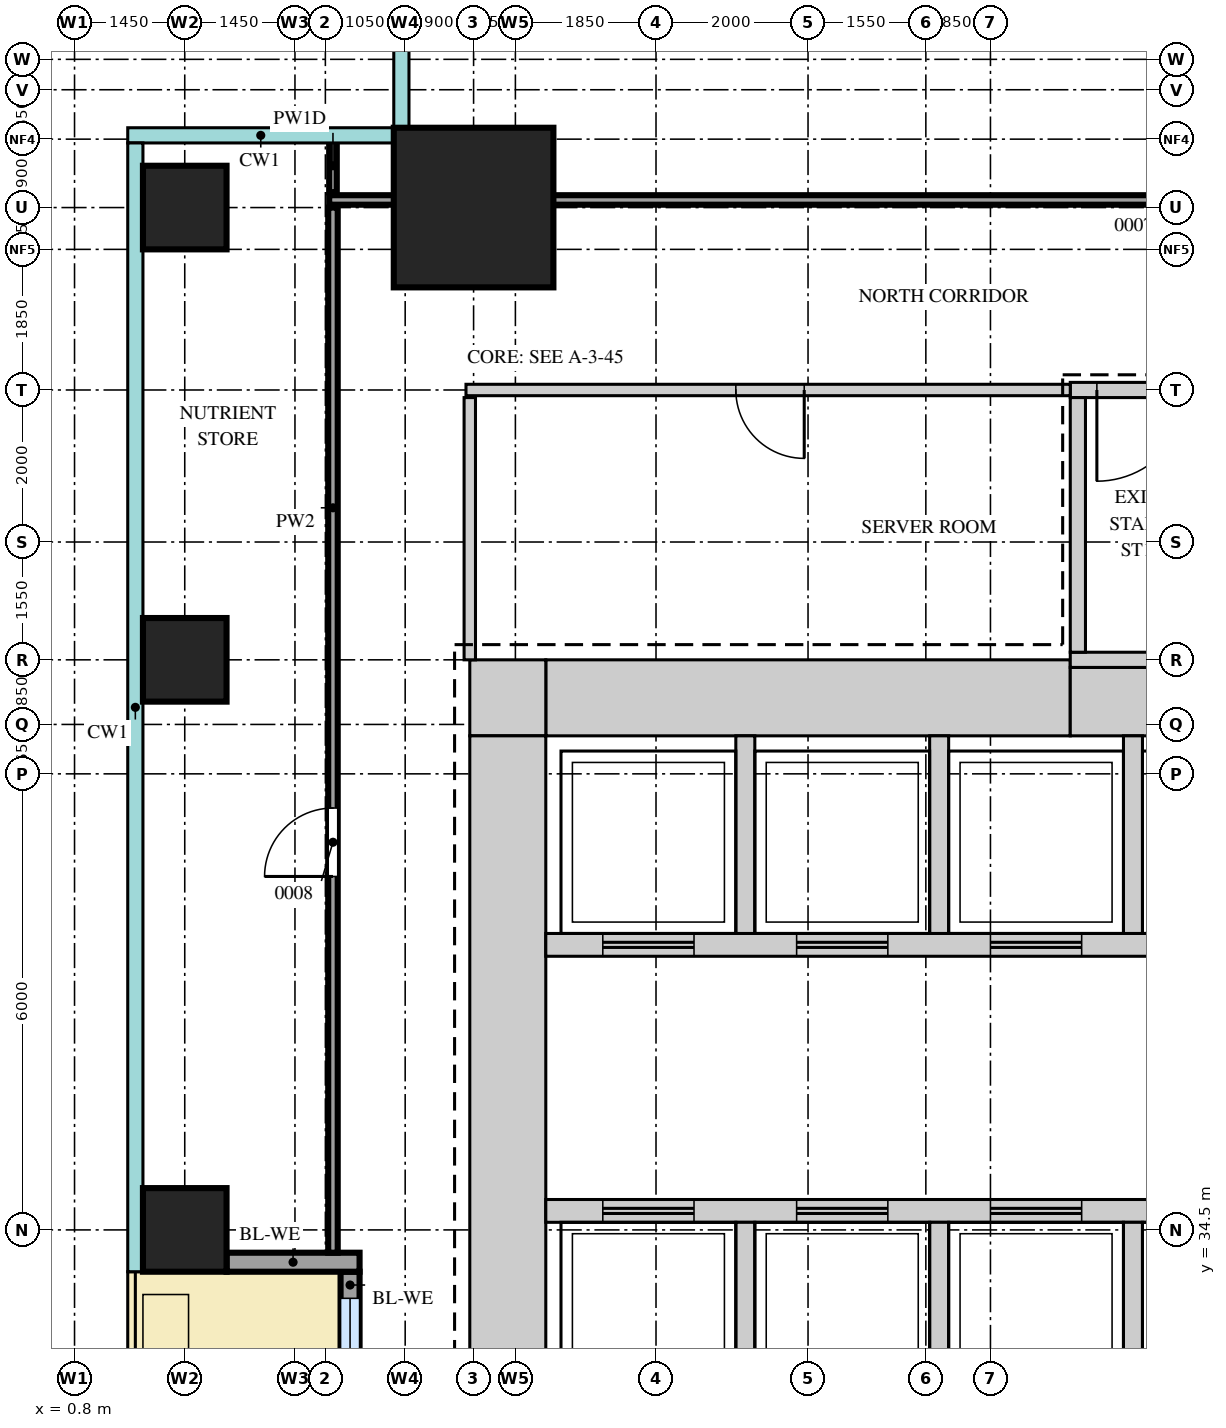
"""IFC4 building model, lengths in metres.
Left out: names, types, materials, properties, quantities, classifications, styles, units other than length and angle.
Written with IfcOpenShell. Run it as: python <this file> out.ifc"""

import sys

from ifc_helpers import new_model, si_unit, direction, frame, frame_2d, origin, origin_2d, place, context, subcontext, project, spatial, rectangle, extrude, source, transform, mapped, element, fill, save


model = new_model("IFC4")
c1 = context("Model", 3, precision=1e-05, world=origin(), true_north=direction((0.0, 1.0)))
c2 = subcontext(c1, "Body", "Model", "MODEL_VIEW")
j1 = project(units=[si_unit("LENGTHUNIT", "METRE"), si_unit("PLANEANGLEUNIT", "RADIAN")], contexts=[c1])
p1 = place(None, origin())
s1 = spatial("IfcSite", under=j1, at=p1, CompositionType="ELEMENT")
p2 = place(p1, origin())
s2 = spatial("IfcBuilding", under=s1, at=p2, CompositionType="ELEMENT")
p3 = place(p2, frame((0.0, 0.0, 136.7)))
s3 = spatial("IfcBuildingStorey", under=s2, at=p3, CompositionType="ELEMENT", Elevation=136.7)
m1 = source(origin(), c2, "Body", "SweptSolid", [
    extrude(rectangle(XDim=6.9, YDim=1.0, at=frame_2d((3.45, 0.0))), origin(), (0.0, 0.0, 1.0), 4.1),
])
p4 = place(p3, frame((7.0, 41.5, 0.0), z_axis=(0.0, 0.0, 1.0), x_axis=(1.0, 0.0, 0.0)))
e1 = element("IfcWall", 1, at=p4, inside=s3, PredefinedType="SHEAR", context=c2, shape_type="MappedRepresentation", body=[
    mapped(m1, transform((0.0, 0.0, 0.0))),
])
m2 = source(origin(), c2, "Body", "SweptSolid", [
    extrude(rectangle(XDim=9.1, YDim=0.9, at=frame_2d((4.55, 0.0))), origin(), (0.0, 0.0, 1.0), 4.1),
])
p5 = place(p3, frame((13.9, 41.45, 0.0), z_axis=(0.0, 0.0, 1.0), x_axis=(1.0, 0.0, 0.0)))
e2 = element("IfcWall", 2, at=p5, inside=s3, PredefinedType="SHEAR", context=c2, shape_type="MappedRepresentation", body=[
    mapped(m2, transform((0.0, 0.0, 0.0))),
])
m3 = source(origin(), c2, "Body", "SweptSolid", [
    extrude(rectangle(XDim=1.0, YDim=1.0, at=frame_2d((0.5, 0.0))), origin(), (0.0, 0.0, 1.0), 4.1),
])
p6 = place(p3, frame((6.0, 41.5, 0.0), z_axis=(0.0, 0.0, 1.0), x_axis=(1.0, 0.0, 0.0)))
e3 = element("IfcWall", 3, at=p6, inside=s3, PredefinedType="SHEAR", context=c2, shape_type="MappedRepresentation", body=[
    mapped(m3, transform((0.0, 0.0, 0.0))),
])
m4 = source(origin(), c2, "Body", "SweptSolid", [
    extrude(rectangle(XDim=28.0, YDim=1.0, at=frame_2d((14.0, 0.0))), origin(), (0.0, 0.0, 1.0), 4.1),
])
p7 = place(p3, frame((6.5, 13.0, 0.0), z_axis=(0.0, 0.0, 1.0), x_axis=(0.0, 1.0, 0.0)))
e4 = element("IfcWall", 4, at=p7, inside=s3, PredefinedType="SHEAR", context=c2, shape_type="MappedRepresentation", body=[
    mapped(m4, transform((0.0, 0.0, 0.0))),
])
m5 = source(origin(), c2, "Body", "SweptSolid", [
    extrude(rectangle(XDim=7.0, YDim=0.2, at=frame_2d((3.5, 0.0))), origin(), (0.0, 0.0, 1.0), 4.1),
])
p8 = place(p3, frame((13.9, 45.55, 0.0), z_axis=(0.0, 0.0, 1.0), x_axis=(1.0, 0.0, 0.0)))
e5 = element("IfcWall", 5, at=p8, inside=s3, PredefinedType="SHEAR", context=c2, shape_type="MappedRepresentation", body=[
    mapped(m5, transform((0.0, 0.0, 0.0))),
])
m6 = source(origin(), c2, "Body", "SweptSolid", [
    extrude(rectangle(XDim=1.2, YDim=2.1, at=frame_2d((0.6, 1.05))), frame((0.0, 0.11, 0.0), z_axis=(0.0, -1.0, 0.0), x_axis=(1.0, 0.0, 0.0)), (0.0, 0.0, 1.0), 0.22),
])
p9 = place(p8, frame((0.35, 0.0, 0.0)))
e6 = element("IfcOpeningElement", 6, at=p9, cuts=e5, PredefinedType="OPENING", context=c2, shape_type="MappedRepresentation", body=[
    mapped(m6, transform((0.0, 0.0, 0.0))),
])
p10 = place(p3, frame((13.9, 42.0, 0.0), z_axis=(0.0, 0.0, 1.0), x_axis=(1.0, 0.0, 0.0)))
e7 = element("IfcWall", 7, at=p10, inside=s3, PredefinedType="SHEAR", context=c2, shape_type="MappedRepresentation", body=[
    mapped(m5, transform((0.0, 0.0, 0.0))),
])
m7 = source(origin(), c2, "Body", "SweptSolid", [
    extrude(rectangle(XDim=3.35, YDim=0.2, at=frame_2d((1.675, 0.0))), origin(), (0.0, 0.0, 1.0), 4.1),
])
p11 = place(p3, frame((14.0, 42.1, 0.0), z_axis=(0.0, 0.0, 1.0), x_axis=(0.0, 1.0, 0.0)))
e8 = element("IfcWall", 8, at=p11, inside=s3, PredefinedType="SHEAR", context=c2, shape_type="MappedRepresentation", body=[
    mapped(m7, transform((0.0, 0.0, 0.0))),
])
m8 = source(origin(), c2, "Body", "SweptSolid", [
    extrude(rectangle(XDim=16.0, YDim=0.3, at=frame_2d((8.0, 0.0))), origin(), (0.0, 0.0, 1.0), 4.1),
])
p12 = place(p3, frame((7.0, 38.25, 0.0), z_axis=(0.0, 0.0, 1.0), x_axis=(1.0, 0.0, 0.0)))
e9 = element("IfcWall", 9, at=p12, inside=s3, PredefinedType="STANDARD", context=c2, shape_type="MappedRepresentation", body=[
    mapped(m8, transform((0.0, 0.0, 0.0))),
])
m9 = source(origin(), c2, "Body", "SweptSolid", [
    extrude(rectangle(XDim=1.2, YDim=2.1, at=frame_2d((0.6, 1.05))), frame((0.0, 0.16, 0.0), z_axis=(0.0, -1.0, 0.0), x_axis=(1.0, 0.0, 0.0)), (0.0, 0.0, 1.0), 0.32),
])
p13 = place(p12, frame((0.75, 0.0, 0.0)))
e10 = element("IfcOpeningElement", 10, at=p13, cuts=e9, PredefinedType="OPENING", context=c2, shape_type="MappedRepresentation", body=[
    mapped(m9, transform((0.0, 0.0, 0.0))),
])
p14 = place(p12, frame((3.3, 0.0, 0.0)))
e11 = element("IfcOpeningElement", 11, at=p14, cuts=e9, PredefinedType="OPENING", context=c2, shape_type="MappedRepresentation", body=[
    mapped(m9, transform((0.0, 0.0, 0.0))),
])
p15 = place(p12, frame((5.85, 0.0, 0.0)))
e12 = element("IfcOpeningElement", 12, at=p15, cuts=e9, PredefinedType="OPENING", context=c2, shape_type="MappedRepresentation", body=[
    mapped(m9, transform((0.0, 0.0, 0.0))),
])
p16 = place(p12, frame((8.4, 0.0, 0.0)))
e13 = element("IfcOpeningElement", 13, at=p16, cuts=e9, PredefinedType="OPENING", context=c2, shape_type="MappedRepresentation", body=[
    mapped(m9, transform((0.0, 0.0, 0.0))),
])
p17 = place(p3, frame((7.0, 34.75, 0.0), z_axis=(0.0, 0.0, 1.0), x_axis=(1.0, 0.0, 0.0)))
e14 = element("IfcWall", 14, at=p17, inside=s3, PredefinedType="STANDARD", context=c2, shape_type="MappedRepresentation", body=[
    mapped(m8, transform((0.0, 0.0, 0.0))),
])
p18 = place(p17, frame((0.75, 0.0, 0.0)))
e15 = element("IfcOpeningElement", 15, at=p18, cuts=e14, PredefinedType="OPENING", context=c2, shape_type="MappedRepresentation", body=[
    mapped(m9, transform((0.0, 0.0, 0.0))),
])
p19 = place(p17, frame((3.3, 0.0, 0.0)))
e16 = element("IfcOpeningElement", 16, at=p19, cuts=e14, PredefinedType="OPENING", context=c2, shape_type="MappedRepresentation", body=[
    mapped(m9, transform((0.0, 0.0, 0.0))),
])
p20 = place(p17, frame((5.85, 0.0, 0.0)))
e17 = element("IfcOpeningElement", 17, at=p20, cuts=e14, PredefinedType="OPENING", context=c2, shape_type="MappedRepresentation", body=[
    mapped(m9, transform((0.0, 0.0, 0.0))),
])
p21 = place(p17, frame((8.4, 0.0, 0.0)))
e18 = element("IfcOpeningElement", 18, at=p21, cuts=e14, PredefinedType="OPENING", context=c2, shape_type="MappedRepresentation", body=[
    mapped(m9, transform((0.0, 0.0, 0.0))),
])
m10 = source(origin(), c2, "Body", "SweptSolid", [
    extrude(rectangle(XDim=2.6, YDim=0.25, at=frame_2d((1.3, 0.0))), origin(), (0.0, 0.0, 1.0), 4.1),
])
for number, where, z_axis, x_axis in (
    (19, (9.625, 38.4, 0.0), (0.0, 0.0, 1.0), (0.0, 1.0, 0.0)),
    (20, (12.175, 38.4, 0.0), (0.0, 0.0, 1.0), (0.0, 1.0, 0.0)),
    (21, (14.725, 38.4, 0.0), (0.0, 0.0, 1.0), (0.0, 1.0, 0.0)),
):
    element("IfcWall", number, at=place(p3, frame(where, z_axis=z_axis, x_axis=x_axis)), inside=s3, PredefinedType="STANDARD", context=c2, shape_type="MappedRepresentation", body=[
        mapped(m10, transform((0.0, 0.0, 0.0))),
    ])
m11 = source(origin(), c2, "Body", "SweptSolid", [
    extrude(rectangle(XDim=2.4, YDim=0.25, at=frame_2d((1.2, 0.0))), origin(), (0.0, 0.0, 1.0), 4.1),
])
for number, where, z_axis, x_axis in (
    (22, (9.625, 32.2, 0.0), (0.0, 0.0, 1.0), (0.0, 1.0, 0.0)),
    (23, (12.175, 32.2, 0.0), (0.0, 0.0, 1.0), (0.0, 1.0, 0.0)),
    (24, (14.725, 32.2, 0.0), (0.0, 0.0, 1.0), (0.0, 1.0, 0.0)),
):
    element("IfcWall", number, at=place(p3, frame(where, z_axis=z_axis, x_axis=x_axis)), inside=s3, PredefinedType="STANDARD", context=c2, shape_type="MappedRepresentation", body=[
        mapped(m11, transform((0.0, 0.0, 0.0))),
    ])
m12 = source(origin(), c2, "Body", "SweptSolid", [
    extrude(rectangle(XDim=2.1, YDim=2.1, at=origin_2d()), origin(), (0.0, 0.0, 1.0), 4.4),
])
p22 = place(p3, frame((6.05, 47.95, 0.0), z_axis=(0.0, 0.0, 1.0), x_axis=(1.0, 0.0, 0.0)))
e25 = element("IfcColumn", 25, at=p22, inside=s3, PredefinedType="COLUMN", context=c2, shape_type="MappedRepresentation", body=[
    mapped(m12, transform((0.0, 0.0, 0.0))),
])
m13 = source(origin(), c2, "Body", "SweptSolid", [
    extrude(rectangle(XDim=1.1, YDim=1.1, at=origin_2d()), origin(), (0.0, 0.0, 1.0), 4.1),
])
for number, where, z_axis, x_axis in (
    (26, (2.25, 34.5, 0.0), (0.0, 0.0, 1.0), (1.0, 0.0, 0.0)),
    (27, (2.25, 42.0, 0.0), (0.0, 0.0, 1.0), (1.0, 0.0, 0.0)),
    (28, (2.25, 47.95, 0.0), (0.0, 0.0, 1.0), (1.0, 0.0, 0.0)),
):
    element("IfcColumn", number, at=place(p3, frame(where, z_axis=z_axis, x_axis=x_axis)), inside=s3, PredefinedType="COLUMN", context=c2, shape_type="MappedRepresentation", body=[
        mapped(m13, transform((0.0, 0.0, 0.0))),
    ])
m14 = source(origin(), c2, "Body", "SweptSolid", [
    extrude(rectangle(XDim=6.4, YDim=0.25, at=frame_2d((3.2, 0.0))), origin(), (0.0, 0.0, 1.0), 3.5),
])
p23 = place(p3, frame((4.425, 27.55, 0.0), z_axis=(0.0, 0.0, 1.0), x_axis=(0.0, 1.0, 0.0)))
e29 = element("IfcWall", 29, at=p23, inside=s3, PredefinedType="SOLIDWALL", context=c2, shape_type="MappedRepresentation", body=[
    mapped(m14, transform((0.0, 0.0, 0.0))),
])
m15 = source(origin(), c2, "Body", "SweptSolid", [
    extrude(rectangle(XDim=1.65, YDim=2.4, at=frame_2d((0.825, 1.2))), frame((0.0, 0.135, 0.0), z_axis=(0.0, -1.0, 0.0), x_axis=(1.0, 0.0, 0.0)), (0.0, 0.0, 1.0), 0.27),
])
p24 = place(p23, frame((0.35, 0.0, 0.0)))
e30 = element("IfcOpeningElement", 30, at=p24, cuts=e29, PredefinedType="OPENING", context=c2, shape_type="MappedRepresentation", body=[
    mapped(m15, transform((0.0, 0.0, 0.0))),
])
p25 = place(p23, frame((4.4, 0.0, 0.0)))
e31 = element("IfcOpeningElement", 31, at=p25, cuts=e29, PredefinedType="OPENING", context=c2, shape_type="MappedRepresentation", body=[
    mapped(m15, transform((0.0, 0.0, 0.0))),
])
m16 = source(origin(), c2, "Body", "SweptSolid", [
    extrude(rectangle(XDim=1.8, YDim=2.4, at=frame_2d((0.9, 1.2))), frame((0.0, 0.135, 0.0), z_axis=(0.0, -1.0, 0.0), x_axis=(1.0, 0.0, 0.0)), (0.0, 0.0, 1.0), 0.27),
])
p26 = place(p23, frame((2.3, 0.0, 0.0)))
e32 = element("IfcOpeningElement", 32, at=p26, cuts=e29, PredefinedType="OPENING", context=c2, shape_type="MappedRepresentation", body=[
    mapped(m16, transform((0.0, 0.0, 0.0))),
])
m17 = source(origin(), c2, "Body", "SweptSolid", [
    extrude(rectangle(XDim=1.75, YDim=0.25, at=frame_2d((0.875, 0.0))), origin(), (0.0, 0.0, 1.0), 3.5),
])
p27 = place(p3, frame((2.8, 34.075, 0.0), z_axis=(0.0, 0.0, 1.0), x_axis=(1.0, 0.0, 0.0)))
e33 = element("IfcWall", 33, at=p27, inside=s3, PredefinedType="SOLIDWALL", context=c2, shape_type="MappedRepresentation", body=[
    mapped(m17, transform((0.0, 0.0, 0.0))),
])
m18 = source(origin(), c2, "Body", "SweptSolid", [
    extrude(rectangle(XDim=13.75, YDim=0.125, at=frame_2d((6.875, 0.0))), origin(), (0.0, 0.0, 1.0), 4.2),
])
p28 = place(p3, frame((4.2, 34.2, 0.0), z_axis=(0.0, 0.0, 1.0), x_axis=(0.0, 1.0, 0.0)))
e34 = element("IfcWall", 34, at=p28, inside=s3, PredefinedType="PARTITIONING", context=c2, shape_type="MappedRepresentation", body=[
    mapped(m18, transform((0.0, 0.0, 0.0))),
])
m19 = source(origin(), c2, "Body", "SweptSolid", [
    extrude(rectangle(XDim=0.9, YDim=2.1, at=frame_2d((0.45, 1.05))), frame((0.0, 0.073, 0.0), z_axis=(0.0, -1.0, 0.0), x_axis=(1.0, 0.0, 0.0)), (0.0, 0.0, 1.0), 0.145),
])
p29 = place(p28, frame((4.95, 0.0, 0.0)))
e35 = element("IfcOpeningElement", 35, at=p29, cuts=e34, PredefinedType="OPENING", context=c2, shape_type="MappedRepresentation", body=[
    mapped(m19, transform((0.0, 0.0, 0.0))),
])
m20 = source(origin(), c2, "Body", "SweptSolid", [
    extrude(rectangle(XDim=3.45, YDim=0.15, at=frame_2d((1.725, 0.0))), origin(), (0.0, 0.0, 1.0), 4.2),
])
p30 = place(p3, frame((6.0, 42.0, 0.0), z_axis=(0.0, 0.0, 1.0), x_axis=(0.0, 1.0, 0.0)))
e36 = element("IfcWall", 36, at=p30, inside=s3, PredefinedType="PARTITIONING", context=c2, shape_type="MappedRepresentation", body=[
    mapped(m20, transform((0.0, 0.0, 0.0))),
])
m21 = source(origin(), c2, "Body", "SweptSolid", [
    extrude(rectangle(XDim=7.95, YDim=0.15, at=frame_2d((3.975, 0.0))), origin(), (0.0, 0.0, 1.0), 4.2),
])
p31 = place(p3, frame((5.95, 45.55, 0.0), z_axis=(0.0, 0.0, 1.0), x_axis=(1.0, 0.0, 0.0)))
e37 = element("IfcWall", 37, at=p31, inside=s3, PredefinedType="PARTITIONING", context=c2, shape_type="MappedRepresentation", body=[
    mapped(m21, transform((0.0, 0.0, 0.0))),
])
m22 = source(origin(), c2, "Body", "SweptSolid", [
    extrude(rectangle(XDim=0.9, YDim=2.1, at=frame_2d((0.45, 1.05))), frame((0.0, 0.085, 0.0), z_axis=(0.0, -1.0, 0.0), x_axis=(1.0, 0.0, 0.0)), (0.0, 0.0, 1.0), 0.17),
])
p32 = place(p31, frame((3.55, 0.0, 0.0)))
e38 = element("IfcOpeningElement", 38, at=p32, cuts=e37, PredefinedType="OPENING", context=c2, shape_type="MappedRepresentation", body=[
    mapped(m22, transform((0.0, 0.0, 0.0))),
])
m23 = source(origin(), c2, "Body", "SweptSolid", [
    extrude(rectangle(XDim=42.2, YDim=0.125, at=frame_2d((21.1, 0.0))), origin(), (0.0, 0.0, 1.0), 3.55),
])
p33 = place(p3, frame((4.15, 48.05, 0.0), z_axis=(0.0, 0.0, 1.0), x_axis=(1.0, 0.0, 0.0)))
e39 = element("IfcWall", 39, at=p33, inside=s3, PredefinedType="PARTITIONING", context=c2, shape_type="MappedRepresentation", body=[
    mapped(m23, transform((0.0, 0.0, 0.0))),
])
p34 = place(p33, frame((11.0, 0.0, 0.0)))
e40 = element("IfcOpeningElement", 40, at=p34, cuts=e39, PredefinedType="OPENING", context=c2, shape_type="MappedRepresentation", body=[
    mapped(m19, transform((0.0, 0.0, 0.0))),
])
p35 = place(p33, frame((32.1, 0.0, 0.0)))
e41 = element("IfcOpeningElement", 41, at=p35, cuts=e39, PredefinedType="OPENING", context=c2, shape_type="MappedRepresentation", body=[
    mapped(m19, transform((0.0, 0.0, 0.0))),
])
m24 = source(origin(), c2, "Body", "SweptSolid", [
    extrude(rectangle(XDim=0.7, YDim=0.1, at=frame_2d((0.35, 0.0))), origin(), (0.0, 0.0, 1.0), 4.2),
])
p36 = place(p3, frame((4.2, 48.15, 0.0), z_axis=(0.0, 0.0, 1.0), x_axis=(0.0, 1.0, 0.0)))
e42 = element("IfcWall", 42, at=p36, inside=s3, PredefinedType="PARTITIONING", context=c2, shape_type="MappedRepresentation", body=[
    mapped(m24, transform((0.0, 0.0, 0.0))),
])
m25 = source(origin(), c2, "Body", "SweptSolid", [
    extrude(rectangle(XDim=1.65, YDim=2.4, at=frame_2d((0.825, 1.2))), frame((0.0, 0.03, 0.0), z_axis=(0.0, -1.0, 0.0), x_axis=(1.0, 0.0, 0.0)), (0.0, 0.0, 1.0), 0.06),
])
p37 = place(p25, origin())
e43 = element("IfcWindow", 43, at=p37, inside=s3, PartitioningType="SINGLE_PANEL", PredefinedType="WINDOW", context=c2, shape_type="MappedRepresentation", body=[
    mapped(m25, transform((0.0, 0.0, 0.0))),
])
fill(e31, e43)
m26 = source(origin(), c2, "Body", "SweptSolid", [
    extrude(rectangle(XDim=0.9, YDim=2.1, at=frame_2d((0.45, 1.05))), frame((0.0, 0.025, 0.0), z_axis=(0.0, -1.0, 0.0), x_axis=(1.0, 0.0, 0.0)), (0.0, 0.0, 1.0), 0.05),
])
p38 = place(p29, origin())
e44 = element("IfcDoor", 44, at=p38, inside=s3, OperationType="SINGLE_SWING_RIGHT", PredefinedType="DOOR", context=c2, shape_type="MappedRepresentation", body=[
    mapped(m26, transform((0.0, 0.0, 0.0))),
])
fill(e35, e44)
p39 = place(p32, origin())
e45 = element("IfcDoor", 45, at=p39, inside=s3, OperationType="SINGLE_SWING_RIGHT", PredefinedType="DOOR", context=c2, shape_type="MappedRepresentation", body=[
    mapped(m26, transform((0.0, 0.0, 0.0))),
])
fill(e38, e45)
m27 = source(origin(), c2, "Body", "SweptSolid", [
    extrude(rectangle(XDim=1.2, YDim=2.1, at=frame_2d((0.6, 1.05))), frame((0.0, 0.025, 0.0), z_axis=(0.0, -1.0, 0.0), x_axis=(1.0, 0.0, 0.0)), (0.0, 0.0, 1.0), 0.05),
])
p40 = place(p9, origin())
e46 = element("IfcDoor", 46, at=p40, inside=s3, OperationType="SINGLE_SWING_LEFT", PredefinedType="DOOR", context=c2, shape_type="MappedRepresentation", body=[
    mapped(m27, transform((0.0, 0.0, 0.0))),
])
fill(e6, e46)
p41 = place(p18, origin())
e47 = element("IfcDoor", 47, at=p41, inside=s3, OperationType="DOUBLE_DOOR_SLIDING", PredefinedType="DOOR", context=c2, shape_type="MappedRepresentation", body=[
    mapped(m27, transform((0.0, 0.0, 0.0))),
])
fill(e15, e47)
p42 = place(p19, origin())
e48 = element("IfcDoor", 48, at=p42, inside=s3, OperationType="DOUBLE_DOOR_SLIDING", PredefinedType="DOOR", context=c2, shape_type="MappedRepresentation", body=[
    mapped(m27, transform((0.0, 0.0, 0.0))),
])
fill(e16, e48)
p43 = place(p20, origin())
e49 = element("IfcDoor", 49, at=p43, inside=s3, OperationType="DOUBLE_DOOR_SLIDING", PredefinedType="DOOR", context=c2, shape_type="MappedRepresentation", body=[
    mapped(m27, transform((0.0, 0.0, 0.0))),
])
fill(e17, e49)
p44 = place(p13, origin())
e50 = element("IfcDoor", 50, at=p44, inside=s3, OperationType="DOUBLE_DOOR_SLIDING", PredefinedType="DOOR", context=c2, shape_type="MappedRepresentation", body=[
    mapped(m27, transform((0.0, 0.0, 0.0))),
])
fill(e10, e50)
p45 = place(p14, origin())
e51 = element("IfcDoor", 51, at=p45, inside=s3, OperationType="DOUBLE_DOOR_SLIDING", PredefinedType="DOOR", context=c2, shape_type="MappedRepresentation", body=[
    mapped(m27, transform((0.0, 0.0, 0.0))),
])
fill(e11, e51)
p46 = place(p15, origin())
e52 = element("IfcDoor", 52, at=p46, inside=s3, OperationType="DOUBLE_DOOR_SLIDING", PredefinedType="DOOR", context=c2, shape_type="MappedRepresentation", body=[
    mapped(m27, transform((0.0, 0.0, 0.0))),
])
fill(e12, e52)
save(model, sys.argv[1])
